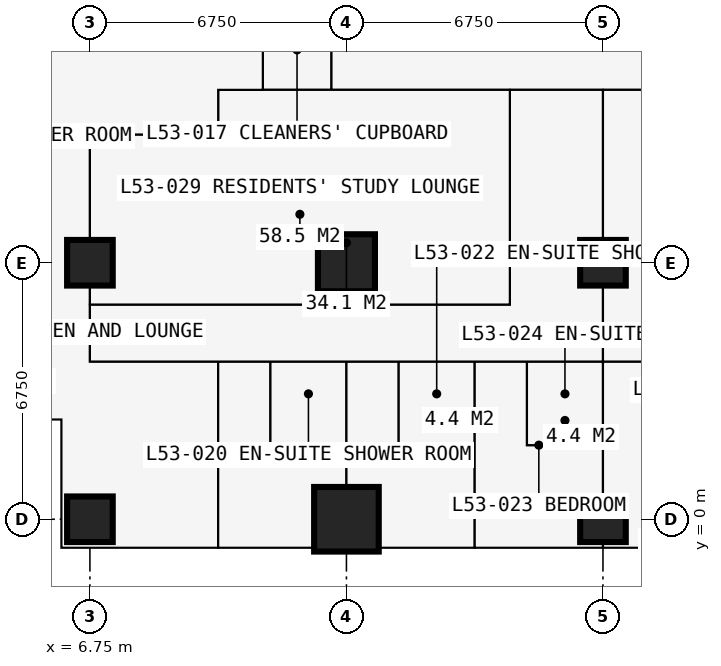
"""IFC4 building model, lengths in metres.
Left out: names, types, materials, properties, quantities, classifications, styles, units other than length and angle.
Written with IfcOpenShell. Run it as: python <this file> out.ifc"""

import sys

from ifc_helpers import new_model, si_unit, direction, frame, frame_2d, origin, origin_2d, place, context, subcontext, project, spatial, rectangle, extrude, element, fill, save


model = new_model("IFC4")
c1 = context("Model", 3, precision=1e-05, world=origin(), true_north=direction((0.0, 1.0)))
c2 = subcontext(c1, "Body", "Model", "MODEL_VIEW")
j1 = project(units=[si_unit("LENGTHUNIT", "METRE"), si_unit("PLANEANGLEUNIT", "RADIAN")], contexts=[c1])
p1 = place(None, origin())
s1 = spatial("IfcSite", under=j1, at=p1, CompositionType="ELEMENT")
p2 = place(p1, origin())
s2 = spatial("IfcBuilding", under=s1, at=p2, CompositionType="ELEMENT")
p3 = place(p2, frame((0.0, 0.0, 196.2)))
s3 = spatial("IfcBuildingStorey", under=s2, at=p3, CompositionType="ELEMENT", Elevation=196.2)
for number, where, z_axis, x_axis in (
    (1, (6.75, 0.0, 0.0), (0.0, 0.0, 1.0), (1.0, 0.0, 0.0)),
    (2, (6.75, 6.75, 0.0), (0.0, 0.0, 1.0), (1.0, 0.0, 0.0)),
):
    element("IfcColumn", number, at=place(p3, frame(where, z_axis=z_axis, x_axis=x_axis)), inside=s3, PredefinedType="COLUMN", context=c2, shape_type="SweptSolid", body=[
        extrude(rectangle(XDim=1.2, YDim=1.2, at=origin_2d()), origin(), (0.0, 0.0, 1.0), 3.6),
    ])
p4 = place(p3, frame((13.5, 0.0, 0.0), z_axis=(0.0, 0.0, 1.0), x_axis=(1.0, 0.0, 0.0)))
e3 = element("IfcColumn", 3, at=p4, inside=s3, PredefinedType="COLUMN", context=c2, shape_type="SweptSolid", body=[
    extrude(rectangle(XDim=1.7, YDim=1.7, at=origin_2d()), origin(), (0.0, 0.0, 1.0), 3.6),
])
p5 = place(p3, frame((13.5, 6.75, 0.0), z_axis=(0.0, 0.0, 1.0), x_axis=(1.0, 0.0, 0.0)))
e4 = element("IfcColumn", 4, at=p5, inside=s3, PredefinedType="COLUMN", context=c2, shape_type="SweptSolid", body=[
    extrude(rectangle(XDim=1.5, YDim=1.5, at=origin_2d()), origin(), (0.0, 0.0, 1.0), 3.6),
])
for number, where, z_axis, x_axis in (
    (5, (20.25, 0.0, 0.0), (0.0, 0.0, 1.0), (1.0, 0.0, 0.0)),
    (6, (20.25, 6.75, 0.0), (0.0, 0.0, 1.0), (1.0, 0.0, 0.0)),
):
    element("IfcColumn", number, at=place(p3, frame(where, z_axis=z_axis, x_axis=x_axis)), inside=s3, PredefinedType="COLUMN", context=c2, shape_type="SweptSolid", body=[
        extrude(rectangle(XDim=1.2, YDim=1.2, at=origin_2d()), origin(), (0.0, 0.0, 1.0), 3.6),
    ])
p6 = place(p3, frame((2.625, 2.625, 0.0), z_axis=(0.0, 0.0, 1.0), x_axis=(1.0, 0.0, 0.0)))
e7 = element("IfcWall", 7, at=p6, inside=s3, PredefinedType="SOLIDWALL", context=c2, shape_type="SweptSolid", body=[
    extrude(rectangle(XDim=3.375, YDim=0.3, at=frame_2d((1.688, 0.0))), origin(), (0.0, 0.0, 1.0), 3.3),
])
p7 = place(p6, frame((0.788, 0.0, 0.6)))
e8 = element("IfcOpeningElement", 8, at=p7, cuts=e7, PredefinedType="OPENING", context=c2, shape_type="SweptSolid", body=[
    extrude(rectangle(XDim=1.8, YDim=2.1, at=frame_2d((0.9, 1.05))), frame((0.0, 0.16, 0.0), z_axis=(0.0, -1.0, 0.0), x_axis=(1.0, 0.0, 0.0)), (0.0, 0.0, 1.0), 0.32),
])
p8 = place(p3, frame((6.0, 2.625, 0.0), z_axis=(0.0, 0.0, 1.0), x_axis=(0.0, -1.0, 0.0)))
e9 = element("IfcWall", 9, at=p8, inside=s3, PredefinedType="SOLIDWALL", context=c2, shape_type="SweptSolid", body=[
    extrude(rectangle(XDim=3.375, YDim=0.3, at=frame_2d((1.688, 0.0))), origin(), (0.0, 0.0, 1.0), 3.3),
])
p9 = place(p8, frame((0.788, 0.0, 0.6)))
e10 = element("IfcOpeningElement", 10, at=p9, cuts=e9, PredefinedType="OPENING", context=c2, shape_type="SweptSolid", body=[
    extrude(rectangle(XDim=1.8, YDim=2.1, at=frame_2d((0.9, 1.05))), frame((0.0, 0.16, 0.0), z_axis=(0.0, -1.0, 0.0), x_axis=(1.0, 0.0, 0.0)), (0.0, 0.0, 1.0), 0.32),
])
p10 = place(p3, frame((-0.734, 10.125, 0.0), z_axis=(0.0, 0.0, 1.0), x_axis=(1.0, 0.0, 0.0)))
e11 = element("IfcWall", 11, at=p10, inside=s3, PredefinedType="PARTITIONING", context=c2, shape_type="SweptSolid", body=[
    extrude(rectangle(XDim=10.859, YDim=0.15, at=frame_2d((5.429, 0.0))), origin(), (0.0, 0.0, 1.0), 3.3),
])
p11 = place(p3, frame((6.75, 4.15, 0.0), z_axis=(0.0, 0.0, 1.0), x_axis=(0.0, 1.0, 0.0)))
e12 = element("IfcWall", 12, at=p11, inside=s3, PredefinedType="PARTITIONING", context=c2, shape_type="SweptSolid", body=[
    extrude(rectangle(XDim=5.975, YDim=0.15, at=frame_2d((2.988, 0.0))), origin(), (0.0, 0.0, 1.0), 2.802),
])
p12 = place(p3, frame((6.75, 4.15, 0.0), z_axis=(0.0, 0.0, 1.0), x_axis=(1.0, 0.0, 0.0)))
e13 = element("IfcWall", 13, at=p12, inside=s3, PredefinedType="PARTITIONING", context=c2, shape_type="SweptSolid", body=[
    extrude(rectangle(XDim=20.25, YDim=0.15, at=frame_2d((10.125, 0.0))), origin(), (0.0, 0.0, 1.0), 3.3),
])
p13 = place(p12, frame((1.2, 0.0, 0.0)))
e14 = element("IfcOpeningElement", 14, at=p13, cuts=e13, PredefinedType="OPENING", context=c2, shape_type="SweptSolid", body=[
    extrude(rectangle(XDim=1.0, YDim=2.2, at=frame_2d((0.5, 1.1))), frame((0.0, 0.085, 0.0), z_axis=(0.0, -1.0, 0.0), x_axis=(1.0, 0.0, 0.0)), (0.0, 0.0, 1.0), 0.17),
])
p14 = place(p12, frame((3.575, 0.0, 0.0)))
e15 = element("IfcOpeningElement", 15, at=p14, cuts=e13, PredefinedType="OPENING", context=c2, shape_type="SweptSolid", body=[
    extrude(rectangle(XDim=0.95, YDim=2.2, at=frame_2d((0.475, 1.1))), frame((0.0, 0.085, 0.0), z_axis=(0.0, -1.0, 0.0), x_axis=(1.0, 0.0, 0.0)), (0.0, 0.0, 1.0), 0.17),
])
p15 = place(p12, frame((7.0, 0.0, 0.0)))
e16 = element("IfcOpeningElement", 16, at=p15, cuts=e13, PredefinedType="OPENING", context=c2, shape_type="SweptSolid", body=[
    extrude(rectangle(XDim=0.95, YDim=2.2, at=frame_2d((0.475, 1.1))), frame((0.0, 0.085, 0.0), z_axis=(0.0, -1.0, 0.0), x_axis=(1.0, 0.0, 0.0)), (0.0, 0.0, 1.0), 0.17),
])
p16 = place(p12, frame((10.375, 0.0, 0.0)))
e17 = element("IfcOpeningElement", 17, at=p16, cuts=e13, PredefinedType="OPENING", context=c2, shape_type="SweptSolid", body=[
    extrude(rectangle(XDim=0.95, YDim=2.2, at=frame_2d((0.475, 1.1))), frame((0.0, 0.085, 0.0), z_axis=(0.0, -1.0, 0.0), x_axis=(1.0, 0.0, 0.0)), (0.0, 0.0, 1.0), 0.17),
])
p17 = place(p12, frame((15.1, 0.0, 0.0)))
e18 = element("IfcOpeningElement", 18, at=p17, cuts=e13, PredefinedType="OPENING", context=c2, shape_type="SweptSolid", body=[
    extrude(rectangle(XDim=0.95, YDim=2.2, at=frame_2d((0.475, 1.1))), frame((0.0, 0.085, 0.0), z_axis=(0.0, -1.0, 0.0), x_axis=(1.0, 0.0, 0.0)), (0.0, 0.0, 1.0), 0.17),
])
p18 = place(p3, frame((6.75, 5.65, 0.0), z_axis=(0.0, 0.0, 1.0), x_axis=(1.0, 0.0, 0.0)))
e19 = element("IfcWall", 19, at=p18, inside=s3, PredefinedType="PARTITIONING", context=c2, shape_type="SweptSolid", body=[
    extrude(rectangle(XDim=11.05, YDim=0.15, at=frame_2d((5.525, 0.0))), origin(), (0.0, 0.0, 1.0), 3.3),
])
p19 = place(p3, frame((10.125, -0.734, 0.0), z_axis=(0.0, 0.0, 1.0), x_axis=(0.0, 1.0, 0.0)))
e20 = element("IfcWall", 20, at=p19, inside=s3, PredefinedType="PARTITIONING", context=c2, shape_type="SweptSolid", body=[
    extrude(rectangle(XDim=4.884, YDim=0.15, at=frame_2d((2.442, 0.0))), origin(), (0.0, 0.0, 1.0), 3.3),
])
p20 = place(p3, frame((10.125, 10.125, 0.0), z_axis=(0.0, 0.0, 1.0), x_axis=(0.0, 1.0, 0.0)))
e21 = element("IfcWall", 21, at=p20, inside=s3, PredefinedType="PARTITIONING", context=c2, shape_type="SweptSolid", body=[
    extrude(rectangle(XDim=1.175, YDim=0.15, at=frame_2d((0.587, 0.0))), origin(), (0.0, 0.0, 1.0), 3.3),
])
p21 = place(p3, frame((10.125, 11.3, 0.0), z_axis=(0.0, 0.0, 1.0), x_axis=(1.0, 0.0, 0.0)))
e22 = element("IfcWall", 22, at=p21, inside=s3, PredefinedType="PARTITIONING", context=c2, shape_type="SweptSolid", body=[
    extrude(rectangle(XDim=20.475, YDim=0.15, at=frame_2d((10.238, 0.0))), origin(), (0.0, 0.0, 1.0), 3.3),
])
p22 = place(p21, frame((8.425, 0.0, 0.0)))
e23 = element("IfcOpeningElement", 23, at=p22, cuts=e22, PredefinedType="OPENING", context=c2, shape_type="SweptSolid", body=[
    extrude(rectangle(XDim=1.0, YDim=2.2, at=frame_2d((0.5, 1.1))), frame((0.0, 0.085, 0.0), z_axis=(0.0, -1.0, 0.0), x_axis=(1.0, 0.0, 0.0)), (0.0, 0.0, 1.0), 0.17),
])
p23 = place(p21, frame((10.975, 0.0, 0.0)))
e24 = element("IfcOpeningElement", 24, at=p23, cuts=e22, PredefinedType="OPENING", context=c2, shape_type="SweptSolid", body=[
    extrude(rectangle(XDim=1.0, YDim=2.2, at=frame_2d((0.5, 1.1))), frame((0.0, 0.085, 0.0), z_axis=(0.0, -1.0, 0.0), x_axis=(1.0, 0.0, 0.0)), (0.0, 0.0, 1.0), 0.17),
])
p24 = place(p21, frame((4.875, 0.0, 0.0)))
e25 = element("IfcOpeningElement", 25, at=p24, cuts=e22, PredefinedType="OPENING", context=c2, shape_type="SweptSolid", body=[
    extrude(rectangle(XDim=0.95, YDim=2.2, at=frame_2d((0.475, 1.1))), frame((0.0, 0.085, 0.0), z_axis=(0.0, -1.0, 0.0), x_axis=(1.0, 0.0, 0.0)), (0.0, 0.0, 1.0), 0.17),
])
p25 = place(p3, frame((11.3, 11.3, 0.0), z_axis=(0.0, 0.0, 1.0), x_axis=(0.0, 1.0, 0.0)))
e26 = element("IfcWall", 26, at=p25, inside=s3, PredefinedType="PARTITIONING", context=c2, shape_type="SweptSolid", body=[
    extrude(rectangle(XDim=19.3, YDim=0.15, at=frame_2d((9.65, 0.0))), origin(), (0.0, 0.0, 1.0), 3.3),
])
p26 = place(p25, frame((18.1, 0.0, 0.0)))
e27 = element("IfcOpeningElement", 27, at=p26, cuts=e26, PredefinedType="OPENING", context=c2, shape_type="SweptSolid", body=[
    extrude(rectangle(XDim=1.0, YDim=2.2, at=frame_2d((0.5, 1.1))), frame((0.0, 0.085, 0.0), z_axis=(0.0, -1.0, 0.0), x_axis=(1.0, 0.0, 0.0)), (0.0, 0.0, 1.0), 0.17),
])
p27 = place(p25, frame((10.137, 0.0, 0.0)))
e28 = element("IfcOpeningElement", 28, at=p27, cuts=e26, PredefinedType="OPENING", context=c2, shape_type="SweptSolid", body=[
    extrude(rectangle(XDim=1.0, YDim=2.2, at=frame_2d((0.5, 1.1))), frame((0.0, 0.085, 0.0), z_axis=(0.0, -1.0, 0.0), x_axis=(1.0, 0.0, 0.0)), (0.0, 0.0, 1.0), 0.17),
])
p28 = place(p3, frame((11.5, 1.95, 0.0), z_axis=(0.0, 0.0, 1.0), x_axis=(0.0, 1.0, 0.0)))
e29 = element("IfcWall", 29, at=p28, inside=s3, PredefinedType="PARTITIONING", context=c2, shape_type="SweptSolid", body=[
    extrude(rectangle(XDim=2.2, YDim=0.1, at=frame_2d((1.1, 0.0))), origin(), (0.0, 0.0, 1.0), 3.3),
])
p29 = place(p28, frame((0.65, 0.0, 0.0)))
e30 = element("IfcOpeningElement", 30, at=p29, cuts=e29, PredefinedType="OPENING", context=c2, shape_type="SweptSolid", body=[
    extrude(rectangle(XDim=0.9, YDim=2.2, at=frame_2d((0.45, 1.1))), frame((0.0, 0.06, 0.0), z_axis=(0.0, -1.0, 0.0), x_axis=(1.0, 0.0, 0.0)), (0.0, 0.0, 1.0), 0.12),
])
p30 = place(p3, frame((11.5, 1.95, 0.0), z_axis=(0.0, 0.0, 1.0), x_axis=(1.0, 0.0, 0.0)))
e31 = element("IfcWall", 31, at=p30, inside=s3, PredefinedType="PARTITIONING", context=c2, shape_type="SweptSolid", body=[
    extrude(rectangle(XDim=2.0, YDim=0.1, at=frame_2d((1.0, 0.0))), origin(), (0.0, 0.0, 1.0), 3.3),
])
p31 = place(p3, frame((13.1, 11.3, 0.0), z_axis=(0.0, 0.0, 1.0), x_axis=(0.0, 1.0, 0.0)))
e32 = element("IfcWall", 32, at=p31, inside=s3, PredefinedType="PARTITIONING", context=c2, shape_type="SweptSolid", body=[
    extrude(rectangle(XDim=1.6, YDim=0.15, at=frame_2d((0.8, 0.0))), origin(), (0.0, 0.0, 1.0), 3.3),
])
p32 = place(p3, frame((13.5, -0.734, 0.0), z_axis=(0.0, 0.0, 1.0), x_axis=(0.0, 1.0, 0.0)))
e33 = element("IfcWall", 33, at=p32, inside=s3, PredefinedType="PARTITIONING", context=c2, shape_type="SweptSolid", body=[
    extrude(rectangle(XDim=4.884, YDim=0.175, at=frame_2d((2.442, 0.0))), origin(), (0.0, 0.0, 1.0), 2.802),
])
p33 = place(p3, frame((14.875, 1.95, 0.0), z_axis=(0.0, 0.0, 1.0), x_axis=(0.0, 1.0, 0.0)))
e34 = element("IfcWall", 34, at=p33, inside=s3, PredefinedType="PARTITIONING", context=c2, shape_type="SweptSolid", body=[
    extrude(rectangle(XDim=2.2, YDim=0.1, at=frame_2d((1.1, 0.0))), origin(), (0.0, 0.0, 1.0), 3.3),
])
p34 = place(p33, frame((0.65, 0.0, 0.0)))
e35 = element("IfcOpeningElement", 35, at=p34, cuts=e34, PredefinedType="OPENING", context=c2, shape_type="SweptSolid", body=[
    extrude(rectangle(XDim=0.9, YDim=2.2, at=frame_2d((0.45, 1.1))), frame((0.0, 0.06, 0.0), z_axis=(0.0, -1.0, 0.0), x_axis=(1.0, 0.0, 0.0)), (0.0, 0.0, 1.0), 0.12),
])
p35 = place(p3, frame((14.875, 1.95, 0.0), z_axis=(0.0, 0.0, 1.0), x_axis=(1.0, 0.0, 0.0)))
e36 = element("IfcWall", 36, at=p35, inside=s3, PredefinedType="PARTITIONING", context=c2, shape_type="SweptSolid", body=[
    extrude(rectangle(XDim=2.0, YDim=0.1, at=frame_2d((1.0, 0.0))), origin(), (0.0, 0.0, 1.0), 3.3),
])
p36 = place(p3, frame((16.875, -0.734, 0.0), z_axis=(0.0, 0.0, 1.0), x_axis=(0.0, 1.0, 0.0)))
e37 = element("IfcWall", 37, at=p36, inside=s3, PredefinedType="PARTITIONING", context=c2, shape_type="SweptSolid", body=[
    extrude(rectangle(XDim=4.884, YDim=0.175, at=frame_2d((2.442, 0.0))), origin(), (0.0, 0.0, 1.0), 3.3),
])
p37 = place(p3, frame((17.8, 5.65, 0.0), z_axis=(0.0, 0.0, 1.0), x_axis=(0.0, 1.0, 0.0)))
e38 = element("IfcWall", 38, at=p37, inside=s3, PredefinedType="PARTITIONING", context=c2, shape_type="SweptSolid", body=[
    extrude(rectangle(XDim=5.65, YDim=0.15, at=frame_2d((2.825, 0.0))), origin(), (0.0, 0.0, 1.0), 3.3),
])
p38 = place(p3, frame((18.25, 1.95, 0.0), z_axis=(0.0, 0.0, 1.0), x_axis=(0.0, 1.0, 0.0)))
e39 = element("IfcWall", 39, at=p38, inside=s3, PredefinedType="PARTITIONING", context=c2, shape_type="SweptSolid", body=[
    extrude(rectangle(XDim=2.2, YDim=0.1, at=frame_2d((1.1, 0.0))), origin(), (0.0, 0.0, 1.0), 3.3),
])
p39 = place(p38, frame((0.65, 0.0, 0.0)))
e40 = element("IfcOpeningElement", 40, at=p39, cuts=e39, PredefinedType="OPENING", context=c2, shape_type="SweptSolid", body=[
    extrude(rectangle(XDim=0.9, YDim=2.2, at=frame_2d((0.45, 1.1))), frame((0.0, 0.06, 0.0), z_axis=(0.0, -1.0, 0.0), x_axis=(1.0, 0.0, 0.0)), (0.0, 0.0, 1.0), 0.12),
])
p40 = place(p3, frame((18.25, 1.95, 0.0), z_axis=(0.0, 0.0, 1.0), x_axis=(1.0, 0.0, 0.0)))
e41 = element("IfcWall", 41, at=p40, inside=s3, PredefinedType="PARTITIONING", context=c2, shape_type="SweptSolid", body=[
    extrude(rectangle(XDim=2.0, YDim=0.1, at=frame_2d((1.0, 0.0))), origin(), (0.0, 0.0, 1.0), 3.3),
])
p41 = place(p3, frame((20.25, -0.734, 0.0), z_axis=(0.0, 0.0, 1.0), x_axis=(0.0, 1.0, 0.0)))
e42 = element("IfcWall", 42, at=p41, inside=s3, PredefinedType="PARTITIONING", context=c2, shape_type="SweptSolid", body=[
    extrude(rectangle(XDim=12.034, YDim=0.15, at=frame_2d((6.017, 0.0))), origin(), (0.0, 0.0, 1.0), 2.802),
])
p42 = place(p9, origin())
e43 = element("IfcWindow", 43, at=p42, inside=s3, PartitioningType="SINGLE_PANEL", PredefinedType="WINDOW", context=c2, shape_type="SweptSolid", body=[
    extrude(rectangle(XDim=1.8, YDim=2.1, at=frame_2d((0.9, 1.05))), frame((0.0, 0.03, 0.0), z_axis=(0.0, -1.0, 0.0), x_axis=(1.0, 0.0, 0.0)), (0.0, 0.0, 1.0), 0.06),
])
fill(e10, e43)
p43 = place(p13, origin())
e44 = element("IfcDoor", 44, at=p43, inside=s3, OperationType="SINGLE_SWING_LEFT", PredefinedType="DOOR", context=c2, shape_type="SweptSolid", body=[
    extrude(rectangle(XDim=1.0, YDim=2.2, at=frame_2d((0.5, 1.1))), frame((0.0, 0.025, 0.0), z_axis=(0.0, -1.0, 0.0), x_axis=(1.0, 0.0, 0.0)), (0.0, 0.0, 1.0), 0.05),
])
fill(e14, e44)
p44 = place(p14, origin())
e45 = element("IfcDoor", 45, at=p44, inside=s3, OperationType="SINGLE_SWING_LEFT", PredefinedType="DOOR", context=c2, shape_type="SweptSolid", body=[
    extrude(rectangle(XDim=0.95, YDim=2.2, at=frame_2d((0.475, 1.1))), frame((0.0, 0.025, 0.0), z_axis=(0.0, -1.0, 0.0), x_axis=(1.0, 0.0, 0.0)), (0.0, 0.0, 1.0), 0.05),
])
fill(e15, e45)
p45 = place(p29, origin())
e46 = element("IfcDoor", 46, at=p45, inside=s3, OperationType="SINGLE_SWING_RIGHT", PredefinedType="DOOR", context=c2, shape_type="SweptSolid", body=[
    extrude(rectangle(XDim=0.9, YDim=2.2, at=frame_2d((0.45, 1.1))), frame((0.0, 0.025, 0.0), z_axis=(0.0, -1.0, 0.0), x_axis=(1.0, 0.0, 0.0)), (0.0, 0.0, 1.0), 0.05),
])
fill(e30, e46)
p46 = place(p15, origin())
e47 = element("IfcDoor", 47, at=p46, inside=s3, OperationType="SINGLE_SWING_LEFT", PredefinedType="DOOR", context=c2, shape_type="SweptSolid", body=[
    extrude(rectangle(XDim=0.95, YDim=2.2, at=frame_2d((0.475, 1.1))), frame((0.0, 0.025, 0.0), z_axis=(0.0, -1.0, 0.0), x_axis=(1.0, 0.0, 0.0)), (0.0, 0.0, 1.0), 0.05),
])
fill(e16, e47)
p47 = place(p34, origin())
e48 = element("IfcDoor", 48, at=p47, inside=s3, OperationType="SINGLE_SWING_RIGHT", PredefinedType="DOOR", context=c2, shape_type="SweptSolid", body=[
    extrude(rectangle(XDim=0.9, YDim=2.2, at=frame_2d((0.45, 1.1))), frame((0.0, 0.025, 0.0), z_axis=(0.0, -1.0, 0.0), x_axis=(1.0, 0.0, 0.0)), (0.0, 0.0, 1.0), 0.05),
])
fill(e35, e48)
p48 = place(p16, origin())
e49 = element("IfcDoor", 49, at=p48, inside=s3, OperationType="SINGLE_SWING_LEFT", PredefinedType="DOOR", context=c2, shape_type="SweptSolid", body=[
    extrude(rectangle(XDim=0.95, YDim=2.2, at=frame_2d((0.475, 1.1))), frame((0.0, 0.025, 0.0), z_axis=(0.0, -1.0, 0.0), x_axis=(1.0, 0.0, 0.0)), (0.0, 0.0, 1.0), 0.05),
])
fill(e17, e49)
p49 = place(p39, origin())
e50 = element("IfcDoor", 50, at=p49, inside=s3, OperationType="SINGLE_SWING_RIGHT", PredefinedType="DOOR", context=c2, shape_type="SweptSolid", body=[
    extrude(rectangle(XDim=0.9, YDim=2.2, at=frame_2d((0.45, 1.1))), frame((0.0, 0.025, 0.0), z_axis=(0.0, -1.0, 0.0), x_axis=(1.0, 0.0, 0.0)), (0.0, 0.0, 1.0), 0.05),
])
fill(e40, e50)
p50 = place(p22, origin())
e51 = element("IfcDoor", 51, at=p50, inside=s3, OperationType="SINGLE_SWING_LEFT", PredefinedType="DOOR", context=c2, shape_type="SweptSolid", body=[
    extrude(rectangle(XDim=1.0, YDim=2.2, at=frame_2d((0.5, 1.1))), frame((0.0, 0.025, 0.0), z_axis=(0.0, -1.0, 0.0), x_axis=(1.0, 0.0, 0.0)), (0.0, 0.0, 1.0), 0.05),
])
fill(e23, e51)
p51 = place(p23, origin())
e52 = element("IfcDoor", 52, at=p51, inside=s3, OperationType="SINGLE_SWING_LEFT", PredefinedType="DOOR", context=c2, shape_type="SweptSolid", body=[
    extrude(rectangle(XDim=1.0, YDim=2.2, at=frame_2d((0.5, 1.1))), frame((0.0, 0.025, 0.0), z_axis=(0.0, -1.0, 0.0), x_axis=(1.0, 0.0, 0.0)), (0.0, 0.0, 1.0), 0.05),
])
fill(e24, e52)
p52 = place(p24, origin())
e53 = element("IfcDoor", 53, at=p52, inside=s3, OperationType="SINGLE_SWING_LEFT", PredefinedType="DOOR", context=c2, shape_type="SweptSolid", body=[
    extrude(rectangle(XDim=0.95, YDim=2.2, at=frame_2d((0.475, 1.1))), frame((0.0, 0.025, 0.0), z_axis=(0.0, -1.0, 0.0), x_axis=(1.0, 0.0, 0.0)), (0.0, 0.0, 1.0), 0.05),
])
fill(e25, e53)
save(model, sys.argv[1])
